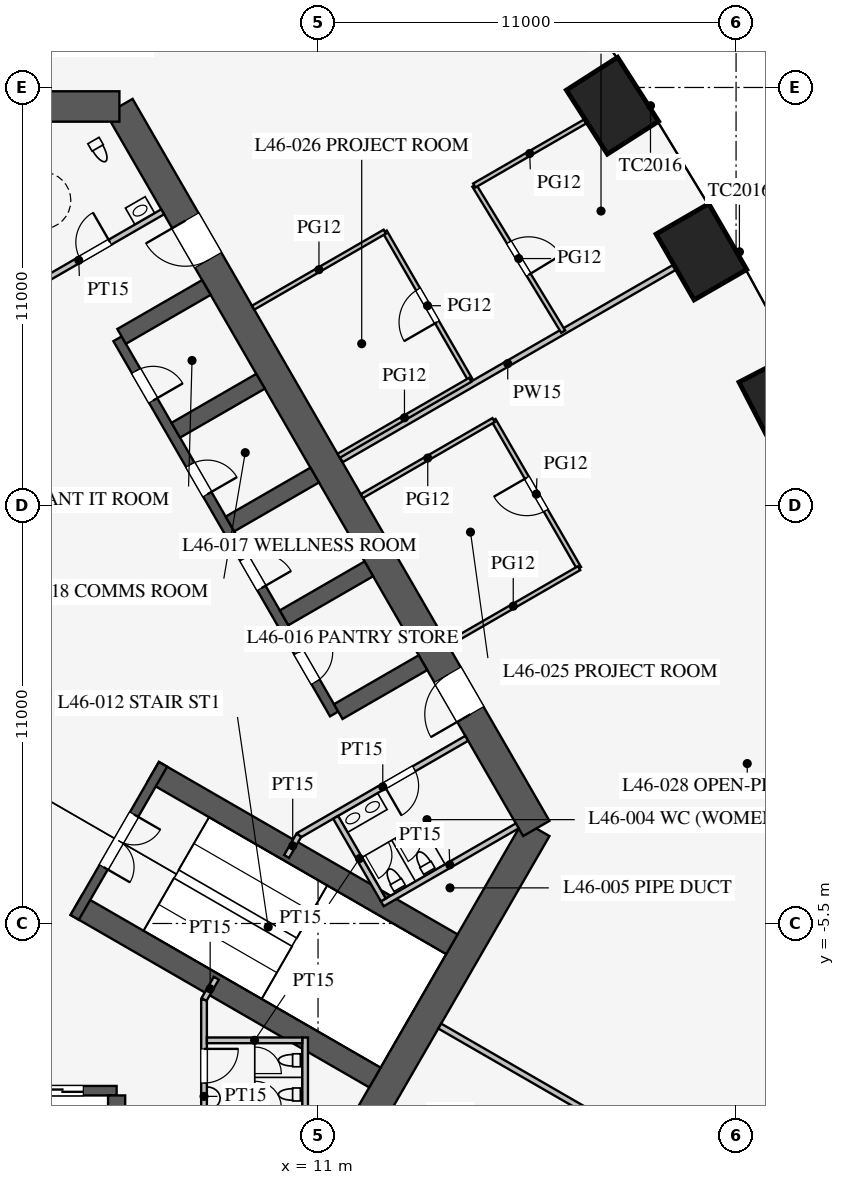
"""IFC4 building model, lengths in metres.
Left out: names, types, materials, properties, quantities, classifications, styles, units other than length and angle.
Written with IfcOpenShell. Run it as: python <this file> out.ifc"""

import sys

from ifc_helpers import new_model, si_unit, direction, frame, frame_2d, origin, origin_2d, place, context, subcontext, project, spatial, rectangle, extrude, element, fill, save


model = new_model("IFC4")
c1 = context("Model", 3, precision=1e-05, world=origin(), true_north=direction((0.0, 1.0)))
c2 = subcontext(c1, "Body", "Model", "MODEL_VIEW")
j1 = project(units=[si_unit("LENGTHUNIT", "METRE"), si_unit("PLANEANGLEUNIT", "RADIAN")], contexts=[c1])
p1 = place(None, origin())
s1 = spatial("IfcSite", under=j1, at=p1, CompositionType="ELEMENT")
p2 = place(p1, origin())
s2 = spatial("IfcBuilding", under=s1, at=p2, CompositionType="ELEMENT")
p3 = place(p2, frame((0.0, 0.0, 202.3)))
s3 = spatial("IfcBuildingStorey", under=s2, at=p3, CompositionType="ELEMENT", Elevation=202.3)
for number, where, z_axis, x_axis in (
    (1, (23.248, 8.226, 0.0), (0.0, 0.0, 1.0), (-0.46, 0.888, 0.0)),
    (2, (21.088, 12.175, 0.0), (0.0, 0.0, 1.0), (-0.5, 0.866, 0.0)),
    (3, (18.748, 16.02, 0.0), (0.0, 0.0, 1.0), (-0.539, 0.842, 0.0)),
):
    element("IfcColumn", number, at=place(p3, frame(where, z_axis=z_axis, x_axis=x_axis)), inside=s3, PredefinedType="COLUMN", context=c2, shape_type="SweptSolid", body=[
        extrude(rectangle(XDim=2.0, YDim=1.6, at=origin_2d()), origin(), (0.0, 0.0, 1.0), 4.2),
    ])
p4 = place(p3, frame((10.97, -13.0, 0.0), z_axis=(0.0, 0.0, 1.0), x_axis=(0.499995765644, 0.866027848477, 0.0)))
e4 = element("IfcWall", 4, at=p4, inside=s3, PredefinedType="SHEAR", context=c2, shape_type="SweptSolid", body=[
    extrude(rectangle(XDim=11.547, YDim=0.8, at=frame_2d((5.773, 0.0))), origin(), (0.0, 0.0, 1.0), 4.2),
])
p5 = place(p3, frame((16.743, -3.0, 0.0), z_axis=(0.0, 0.0, 1.0), x_axis=(-0.500002442456, 0.866023993627, 0.0)))
e5 = element("IfcWall", 5, at=p5, inside=s3, PredefinedType="SHEAR", context=c2, shape_type="SweptSolid", body=[
    extrude(rectangle(XDim=21.939, YDim=0.8, at=frame_2d((10.97, 0.0))), origin(), (0.0, 0.0, 1.0), 4.2),
])
p6 = place(p5, frame((17.27, 0.0, 0.0)))
e6 = element("IfcOpeningElement", 6, at=p6, cuts=e5, PredefinedType="OPENING", context=c2, shape_type="SweptSolid", body=[
    extrude(rectangle(XDim=1.2, YDim=2.1, at=frame_2d((0.6, 1.05))), frame((0.0, 0.41, 0.0), z_axis=(0.0, -1.0, 0.0), x_axis=(1.0, 0.0, 0.0)), (0.0, 0.0, 1.0), 0.82),
])
p7 = place(p5, frame((3.47, 0.0, 0.0)))
e7 = element("IfcOpeningElement", 7, at=p7, cuts=e5, PredefinedType="OPENING", context=c2, shape_type="SweptSolid", body=[
    extrude(rectangle(XDim=1.2, YDim=2.1, at=frame_2d((0.6, 1.05))), frame((0.0, 0.41, 0.0), z_axis=(0.0, -1.0, 0.0), x_axis=(1.0, 0.0, 0.0)), (0.0, 0.0, 1.0), 0.82),
])
p8 = place(p3, frame((5.773, 16.0, 0.0), z_axis=(0.0, 0.0, 1.0), x_axis=(-1.0, 0.0, 0.0)))
e8 = element("IfcWall", 8, at=p8, inside=s3, PredefinedType="SHEAR", context=c2, shape_type="SweptSolid", body=[
    extrude(rectangle(XDim=11.547, YDim=0.8, at=frame_2d((5.773, 0.0))), origin(), (0.0, 0.0, 1.0), 4.2),
])
p9 = place(p3, frame((-5.7, -9.9, 0.0), z_axis=(0.0, 0.0, 1.0), x_axis=(1.0, 0.0, 0.0)))
e9 = element("IfcWall", 9, at=p9, inside=s3, PredefinedType="SHEAR", context=c2, shape_type="SweptSolid", body=[
    extrude(rectangle(XDim=11.4, YDim=0.25, at=frame_2d((5.7, 0.0))), origin(), (0.0, 0.0, 1.0), 4.2),
])
p10 = place(p9, frame((0.875, 0.0, 0.0)))
e10 = element("IfcOpeningElement", 10, at=p10, cuts=e9, PredefinedType="OPENING", context=c2, shape_type="SweptSolid", body=[
    extrude(rectangle(XDim=1.1, YDim=2.2, at=frame_2d((0.55, 1.1))), frame((0.0, 0.135, 0.0), z_axis=(0.0, -1.0, 0.0), x_axis=(1.0, 0.0, 0.0)), (0.0, 0.0, 1.0), 0.27),
])
p11 = place(p9, frame((3.725, 0.0, 0.0)))
e11 = element("IfcOpeningElement", 11, at=p11, cuts=e9, PredefinedType="OPENING", context=c2, shape_type="SweptSolid", body=[
    extrude(rectangle(XDim=1.1, YDim=2.2, at=frame_2d((0.55, 1.1))), frame((0.0, 0.135, 0.0), z_axis=(0.0, -1.0, 0.0), x_axis=(1.0, 0.0, 0.0)), (0.0, 0.0, 1.0), 0.27),
])
p12 = place(p9, frame((6.575, 0.0, 0.0)))
e12 = element("IfcOpeningElement", 12, at=p12, cuts=e9, PredefinedType="OPENING", context=c2, shape_type="SweptSolid", body=[
    extrude(rectangle(XDim=1.1, YDim=2.2, at=frame_2d((0.55, 1.1))), frame((0.0, 0.135, 0.0), z_axis=(0.0, -1.0, 0.0), x_axis=(1.0, 0.0, 0.0)), (0.0, 0.0, 1.0), 0.27),
])
p13 = place(p9, frame((9.425, 0.0, 0.0)))
e13 = element("IfcOpeningElement", 13, at=p13, cuts=e9, PredefinedType="OPENING", context=c2, shape_type="SweptSolid", body=[
    extrude(rectangle(XDim=1.1, YDim=2.2, at=frame_2d((0.55, 1.1))), frame((0.0, 0.135, 0.0), z_axis=(0.0, -1.0, 0.0), x_axis=(1.0, 0.0, 0.0)), (0.0, 0.0, 1.0), 0.27),
])
p14 = place(p3, frame((5.7, -10.025, 0.0), z_axis=(0.0, 0.0, 1.0), x_axis=(0.0, -1.0, 0.0)))
e14 = element("IfcWall", 14, at=p14, inside=s3, PredefinedType="SHEAR", context=c2, shape_type="SweptSolid", body=[
    extrude(rectangle(XDim=2.575, YDim=0.45, at=frame_2d((1.288, 0.0))), origin(), (0.0, 0.0, 1.0), 4.2),
])
p15 = place(p3, frame((11.424, 0.014, 0.0), z_axis=(0.0, 0.0, 1.0), x_axis=(-0.500001763848, 0.866024385424, 0.0)))
e15 = element("IfcWall", 15, at=p15, inside=s3, PredefinedType="SHEAR", context=c2, shape_type="SweptSolid", body=[
    extrude(rectangle(XDim=11.4, YDim=0.25, at=frame_2d((5.7, 0.0))), origin(), (0.0, 0.0, 1.0), 4.2),
])
p16 = place(p15, frame((0.975, 0.0, 0.0)))
e16 = element("IfcOpeningElement", 16, at=p16, cuts=e15, PredefinedType="OPENING", context=c2, shape_type="SweptSolid", body=[
    extrude(rectangle(XDim=0.9, YDim=2.1, at=frame_2d((0.45, 1.05))), frame((0.0, 0.135, 0.0), z_axis=(0.0, -1.0, 0.0), x_axis=(1.0, 0.0, 0.0)), (0.0, 0.0, 1.0), 0.27),
])
p17 = place(p15, frame((3.825, 0.0, 0.0)))
e17 = element("IfcOpeningElement", 17, at=p17, cuts=e15, PredefinedType="OPENING", context=c2, shape_type="SweptSolid", body=[
    extrude(rectangle(XDim=0.9, YDim=2.1, at=frame_2d((0.45, 1.05))), frame((0.0, 0.135, 0.0), z_axis=(0.0, -1.0, 0.0), x_axis=(1.0, 0.0, 0.0)), (0.0, 0.0, 1.0), 0.27),
])
p18 = place(p15, frame((6.675, 0.0, 0.0)))
e18 = element("IfcOpeningElement", 18, at=p18, cuts=e15, PredefinedType="OPENING", context=c2, shape_type="SweptSolid", body=[
    extrude(rectangle(XDim=0.9, YDim=2.1, at=frame_2d((0.45, 1.05))), frame((0.0, 0.135, 0.0), z_axis=(0.0, -1.0, 0.0), x_axis=(1.0, 0.0, 0.0)), (0.0, 0.0, 1.0), 0.27),
])
p19 = place(p15, frame((9.525, 0.0, 0.0)))
e19 = element("IfcOpeningElement", 19, at=p19, cuts=e15, PredefinedType="OPENING", context=c2, shape_type="SweptSolid", body=[
    extrude(rectangle(XDim=0.9, YDim=2.1, at=frame_2d((0.45, 1.05))), frame((0.0, 0.135, 0.0), z_axis=(0.0, -1.0, 0.0), x_axis=(1.0, 0.0, 0.0)), (0.0, 0.0, 1.0), 0.27),
])
for number, where, z_axis, x_axis in (
    (20, (11.532, 0.076, 0.0), (0.0, 0.0, 1.0), (0.866, 0.5, 0.0)),
    (21, (10.107, 2.544, 0.0), (0.0, 0.0, 1.0), (0.866, 0.5, 0.0)),
    (22, (8.682, 5.012, 0.0), (0.0, 0.0, 1.0), (0.866, 0.5, 0.0)),
    (23, (7.257, 7.481, 0.0), (0.0, 0.0, 1.0), (0.866, 0.5, 0.0)),
):
    element("IfcWall", number, at=place(p3, frame(where, z_axis=z_axis, x_axis=x_axis)), inside=s3, PredefinedType="SHEAR", context=c2, shape_type="SweptSolid", body=[
        extrude(rectangle(XDim=2.575, YDim=0.45, at=frame_2d((1.288, 0.0))), origin(), (0.0, 0.0, 1.0), 4.2),
    ])
p20 = place(p3, frame((5.832, 9.949, 0.0), z_axis=(0.0, 0.0, 1.0), x_axis=(0.866029291668, 0.499993265928, 0.0)))
e24 = element("IfcWall", 24, at=p20, inside=s3, PredefinedType="SHEAR", context=c2, shape_type="SweptSolid", body=[
    extrude(rectangle(XDim=2.575, YDim=0.45, at=frame_2d((1.288, 0.0))), origin(), (0.0, 0.0, 1.0), 4.2),
])
for number, where, z_axis, x_axis in (
    (25, (4.638, -5.016, 0.0), (0.0, 0.0, 1.0), (0.866, -0.5, 0.0)),
    (26, (6.663, -1.509, 0.0), (0.0, 0.0, 1.0), (0.866, -0.5, 0.0)),
):
    element("IfcWall", number, at=place(p3, frame(where, z_axis=z_axis, x_axis=x_axis)), inside=s3, PredefinedType="SHEAR", context=c2, shape_type="SweptSolid", body=[
        extrude(rectangle(XDim=9.075, YDim=0.6, at=frame_2d((4.538, 0.0))), origin(), (0.0, 0.0, 1.0), 4.2),
    ])
p21 = place(p3, frame((4.597, -5.339, 0.0), z_axis=(0.0, 0.0, 1.0), x_axis=(0.499984536904, 0.866034331223, 0.0)))
e27 = element("IfcWall", 27, at=p21, inside=s3, PredefinedType="SHEAR", context=c2, shape_type="SweptSolid", body=[
    extrude(rectangle(XDim=4.65, YDim=0.25, at=frame_2d((2.325, 0.0))), origin(), (0.0, 0.0, 1.0), 4.2),
])
p22 = place(p21, frame((1.525, 0.0, 0.0)))
e28 = element("IfcOpeningElement", 28, at=p22, cuts=e27, PredefinedType="OPENING", context=c2, shape_type="SweptSolid", body=[
    extrude(rectangle(XDim=1.6, YDim=2.1, at=frame_2d((0.8, 1.05))), frame((0.0, 0.135, 0.0), z_axis=(0.0, -1.0, 0.0), x_axis=(1.0, 0.0, 0.0)), (0.0, 0.0, 1.0), 0.27),
])
p23 = place(p3, frame((8.0, -7.5, 0.0), z_axis=(0.0, 0.0, 1.0), x_axis=(0.0, -1.0, 0.0)))
e29 = element("IfcWall", 29, at=p23, inside=s3, PredefinedType="PARTITIONING", context=c2, shape_type="SweptSolid", body=[
    extrude(rectangle(XDim=5.1, YDim=0.15, at=frame_2d((2.55, 0.0))), origin(), (0.0, 0.0, 1.0), 4.0),
])
p24 = place(p23, frame((1.3, 0.0, 0.0)))
e30 = element("IfcOpeningElement", 30, at=p24, cuts=e29, PredefinedType="OPENING", context=c2, shape_type="SweptSolid", body=[
    extrude(rectangle(XDim=0.9, YDim=2.1, at=frame_2d((0.45, 1.05))), frame((0.0, 0.085, 0.0), z_axis=(0.0, -1.0, 0.0), x_axis=(1.0, 0.0, 0.0)), (0.0, 0.0, 1.0), 0.17),
])
p25 = place(p3, frame((2.495, 10.678, 0.0), z_axis=(0.0, 0.0, 1.0), x_axis=(0.86602216432, 0.500005610874, 0.0)))
e31 = element("IfcWall", 31, at=p25, inside=s3, PredefinedType="PARTITIONING", context=c2, shape_type="SweptSolid", body=[
    extrude(rectangle(XDim=5.1, YDim=0.15, at=frame_2d((2.55, 0.0))), origin(), (0.0, 0.0, 1.0), 4.0),
])
p26 = place(p25, frame((2.6, 0.0, 0.0)))
e32 = element("IfcOpeningElement", 32, at=p26, cuts=e31, PredefinedType="OPENING", context=c2, shape_type="SweptSolid", body=[
    extrude(rectangle(XDim=0.9, YDim=2.1, at=frame_2d((0.45, 1.05))), frame((0.0, 0.085, 0.0), z_axis=(0.0, -1.0, 0.0), x_axis=(1.0, 0.0, 0.0)), (0.0, 0.0, 1.0), 0.17),
])
p27 = place(p3, frame((10.495, -3.178, 0.0), z_axis=(0.0, 0.0, 1.0), x_axis=(0.86602216432, 0.500005610874, 0.0)))
e33 = element("IfcWall", 33, at=p27, inside=s3, PredefinedType="PARTITIONING", context=c2, shape_type="SweptSolid", body=[
    extrude(rectangle(XDim=5.1, YDim=0.15, at=frame_2d((2.55, 0.0))), origin(), (0.0, 0.0, 1.0), 4.0),
])
p28 = place(p27, frame((2.6, 0.0, 0.0)))
e34 = element("IfcOpeningElement", 34, at=p28, cuts=e33, PredefinedType="OPENING", context=c2, shape_type="SweptSolid", body=[
    extrude(rectangle(XDim=0.9, YDim=2.1, at=frame_2d((0.45, 1.05))), frame((0.0, 0.085, 0.0), z_axis=(0.0, -1.0, 0.0), x_axis=(1.0, 0.0, 0.0)), (0.0, 0.0, 1.0), 0.17),
])
for number, where, z_axis, x_axis in (
    (35, (8.0, -7.5, 0.0), (0.0, 0.0, 1.0), (0.5, 0.866, 0.0)),
    (36, (10.495, -3.178, 0.0), (0.0, 0.0, 1.0), (-0.5, -0.866, 0.0)),
):
    element("IfcWall", number, at=place(p3, frame(where, z_axis=z_axis, x_axis=x_axis)), inside=s3, PredefinedType="PARTITIONING", context=c2, shape_type="SweptSolid", body=[
        extrude(rectangle(XDim=0.645, YDim=0.15, at=frame_2d((0.323, 0.0))), origin(), (0.0, 0.0, 1.0), 4.0),
    ])
p29 = place(p3, frame((10.66, -8.5, 0.0), z_axis=(0.0, 0.0, 1.0), x_axis=(0.0, -1.0, 0.0)))
e37 = element("IfcWall", 37, at=p29, inside=s3, PredefinedType="PARTITIONING", context=c2, shape_type="SweptSolid", body=[
    extrude(rectangle(XDim=4.1, YDim=0.15, at=frame_2d((2.05, 0.0))), origin(), (0.0, 0.0, 1.0), 4.0),
])
p30 = place(p3, frame((8.075, -8.575, 0.0), z_axis=(0.0, 0.0, 1.0), x_axis=(1.0, 0.0, 0.0)))
e38 = element("IfcWall", 38, at=p30, inside=s3, PredefinedType="PARTITIONING", context=c2, shape_type="SweptSolid", body=[
    extrude(rectangle(XDim=2.51, YDim=0.15, at=frame_2d((1.255, 0.0))), origin(), (0.0, 0.0, 1.0), 4.0),
])
p31 = place(p3, frame((12.691, -4.982, 0.0), z_axis=(0.0, 0.0, 1.0), x_axis=(0.8660249478, 0.500000789788, 0.0)))
e39 = element("IfcWall", 39, at=p31, inside=s3, PredefinedType="PARTITIONING", context=c2, shape_type="SweptSolid", body=[
    extrude(rectangle(XDim=4.1, YDim=0.15, at=frame_2d((2.05, 0.0))), origin(), (0.0, 0.0, 1.0), 4.0),
])
p32 = place(p3, frame((11.464, -2.706, 0.0), z_axis=(0.0, 0.0, 1.0), x_axis=(0.50001992892, -0.866013897511, 0.0)))
e40 = element("IfcWall", 40, at=p32, inside=s3, PredefinedType="PARTITIONING", context=c2, shape_type="SweptSolid", body=[
    extrude(rectangle(XDim=2.51, YDim=0.15, at=frame_2d((1.255, 0.0))), origin(), (0.0, 0.0, 1.0), 4.0),
])
p33 = place(p3, frame((14.203, -8.2, 0.0), z_axis=(0.0, 0.0, 1.0), x_axis=(0.866021600284, -0.500006587798, 0.0)))
e41 = element("IfcWall", 41, at=p33, inside=s3, PredefinedType="PARTITIONING", context=c2, shape_type="SweptSolid", body=[
    extrude(rectangle(XDim=14.95, YDim=0.15, at=frame_2d((7.475, 0.0))), origin(), (0.0, 0.0, 1.0), 2.4),
])
p34 = place(p3, frame((11.613, 6.705, 0.0), z_axis=(0.0, 0.0, 1.0), x_axis=(0.866032382055, 0.499987913086, 0.0)))
e42 = element("IfcWall", 42, at=p34, inside=s3, PredefinedType="PARTITIONING", context=c2, shape_type="SweptSolid", body=[
    extrude(rectangle(XDim=10.111, YDim=0.15, at=frame_2d((5.055, 0.0))), origin(), (0.0, 0.0, 1.0), 3.3),
])
p35 = place(p3, frame((15.006, 8.808, 0.0), z_axis=(0.0, 0.0, 1.0), x_axis=(-0.500013631625, 0.866017533419, 0.0)))
e43 = element("IfcWall", 43, at=p35, inside=s3, PredefinedType="PARTITIONING", context=c2, shape_type="SweptSolid", body=[
    extrude(rectangle(XDim=4.5, YDim=0.12, at=frame_2d((2.25, 0.0))), origin(), (0.0, 0.0, 1.0), 2.9),
])
p36 = place(p35, frame((1.75, 0.0, 0.15)))
e44 = element("IfcOpeningElement", 44, at=p36, cuts=e43, PredefinedType="OPENING", context=c2, shape_type="SweptSolid", body=[
    extrude(rectangle(XDim=1.0, YDim=2.1, at=frame_2d((0.5, 1.05))), frame((0.0, 0.07, 0.0), z_axis=(0.0, -1.0, 0.0), x_axis=(1.0, 0.0, 0.0)), (0.0, 0.0, 1.0), 0.14),
])
p37 = place(p3, frame((17.869, 3.85, 0.0), z_axis=(0.0, 0.0, 1.0), x_axis=(-0.500013631625, 0.866017533419, 0.0)))
e45 = element("IfcWall", 45, at=p37, inside=s3, PredefinedType="PARTITIONING", context=c2, shape_type="SweptSolid", body=[
    extrude(rectangle(XDim=4.5, YDim=0.12, at=frame_2d((2.25, 0.0))), origin(), (0.0, 0.0, 1.0), 2.9),
])
p38 = place(p37, frame((1.75, 0.0, 0.15)))
e46 = element("IfcOpeningElement", 46, at=p38, cuts=e45, PredefinedType="OPENING", context=c2, shape_type="SweptSolid", body=[
    extrude(rectangle(XDim=1.0, YDim=2.1, at=frame_2d((0.5, 1.05))), frame((0.0, 0.07, 0.0), z_axis=(0.0, -1.0, 0.0), x_axis=(1.0, 0.0, 0.0)), (0.0, 0.0, 1.0), 0.14),
])
for number, where, z_axis, x_axis in (
    (47, (11.542, 6.808, 0.0), (0.0, 0.0, 1.0), (0.866, 0.5, 0.0)),
    (48, (9.292, 10.705, 0.0), (0.0, 0.0, 1.0), (0.866, 0.5, 0.0)),
    (49, (12.155, 5.747, 0.0), (0.0, 0.0, 1.0), (0.866, 0.5, 0.0)),
    (50, (14.405, 1.85, 0.0), (0.0, 0.0, 1.0), (0.866, 0.5, 0.0)),
):
    element("IfcWall", number, at=place(p3, frame(where, z_axis=z_axis, x_axis=x_axis)), inside=s3, PredefinedType="PARTITIONING", context=c2, shape_type="SweptSolid", body=[
        extrude(rectangle(XDim=4.0, YDim=0.12, at=frame_2d((2.0, 0.0))), origin(), (0.0, 0.0, 1.0), 2.9),
    ])
p39 = place(p3, frame((17.451, 10.075, 0.0), z_axis=(0.0, 0.0, 1.0), x_axis=(-0.519790350351, 0.85429385558, 0.0)))
e51 = element("IfcWall", 51, at=p39, inside=s3, PredefinedType="PARTITIONING", context=c2, shape_type="SweptSolid", body=[
    extrude(rectangle(XDim=4.501, YDim=0.12, at=frame_2d((2.25, 0.0))), origin(), (0.0, 0.0, 1.0), 2.9),
])
p40 = place(p39, frame((1.75, 0.0, 0.15)))
e52 = element("IfcOpeningElement", 52, at=p40, cuts=e51, PredefinedType="OPENING", context=c2, shape_type="SweptSolid", body=[
    extrude(rectangle(XDim=1.0, YDim=2.1, at=frame_2d((0.5, 1.05))), frame((0.0, 0.07, 0.0), z_axis=(0.0, -1.0, 0.0), x_axis=(1.0, 0.0, 0.0)), (0.0, 0.0, 1.0), 0.14),
])
p41 = place(p3, frame((15.111, 13.921, 0.0), z_axis=(0.0, 0.0, 1.0), x_axis=(0.865999698775, 0.50004451974, 0.0)))
e53 = element("IfcWall", 53, at=p41, inside=s3, PredefinedType="PARTITIONING", context=c2, shape_type="SweptSolid", body=[
    extrude(rectangle(XDim=3.368, YDim=0.12, at=frame_2d((1.684, 0.0))), origin(), (0.0, 0.0, 1.0), 2.9),
])
p42 = place(p24, origin())
e54 = element("IfcDoor", 54, at=p42, inside=s3, OperationType="SINGLE_SWING_LEFT", PredefinedType="DOOR", context=c2, shape_type="SweptSolid", body=[
    extrude(rectangle(XDim=0.9, YDim=2.1, at=frame_2d((0.45, 1.05))), frame((0.0, 0.025, 0.0), z_axis=(0.0, -1.0, 0.0), x_axis=(1.0, 0.0, 0.0)), (0.0, 0.0, 1.0), 0.05),
])
fill(e30, e54)
p43 = place(p26, origin())
e55 = element("IfcDoor", 55, at=p43, inside=s3, OperationType="SINGLE_SWING_RIGHT", PredefinedType="DOOR", context=c2, shape_type="SweptSolid", body=[
    extrude(rectangle(XDim=0.9, YDim=2.1, at=frame_2d((0.45, 1.05))), frame((0.0, 0.025, 0.0), z_axis=(0.0, -1.0, 0.0), x_axis=(1.0, 0.0, 0.0)), (0.0, 0.0, 1.0), 0.05),
])
fill(e32, e55)
p44 = place(p28, frame((0.9, 0.0, 0.0), z_axis=(0.0, 0.0, 1.0), x_axis=(-1.0, 0.0, 0.0)))
e56 = element("IfcDoor", 56, at=p44, inside=s3, OperationType="SINGLE_SWING_RIGHT", PredefinedType="DOOR", context=c2, shape_type="SweptSolid", body=[
    extrude(rectangle(XDim=0.9, YDim=2.1, at=frame_2d((0.45, 1.05))), frame((0.0, 0.025, 0.0), z_axis=(0.0, -1.0, 0.0), x_axis=(1.0, 0.0, 0.0)), (0.0, 0.0, 1.0), 0.05),
])
fill(e34, e56)
p45 = place(p22, frame((1.6, 0.0, 0.0), z_axis=(0.0, 0.0, 1.0), x_axis=(-1.0, 0.0, 0.0)))
e57 = element("IfcDoor", 57, at=p45, inside=s3, OperationType="DOUBLE_DOOR_SINGLE_SWING", PredefinedType="DOOR", context=c2, shape_type="SweptSolid", body=[
    extrude(rectangle(XDim=1.6, YDim=2.1, at=frame_2d((0.8, 1.05))), frame((0.0, 0.025, 0.0), z_axis=(0.0, -1.0, 0.0), x_axis=(1.0, 0.0, 0.0)), (0.0, 0.0, 1.0), 0.05),
])
fill(e28, e57)
p46 = place(p6, origin())
e58 = element("IfcDoor", 58, at=p46, inside=s3, OperationType="SINGLE_SWING_RIGHT", PredefinedType="DOOR", context=c2, shape_type="SweptSolid", body=[
    extrude(rectangle(XDim=1.2, YDim=2.1, at=frame_2d((0.6, 1.05))), frame((0.0, 0.025, 0.0), z_axis=(0.0, -1.0, 0.0), x_axis=(1.0, 0.0, 0.0)), (0.0, 0.0, 1.0), 0.05),
])
fill(e6, e58)
p47 = place(p7, origin())
e59 = element("IfcDoor", 59, at=p47, inside=s3, OperationType="SINGLE_SWING_LEFT", PredefinedType="DOOR", context=c2, shape_type="SweptSolid", body=[
    extrude(rectangle(XDim=1.2, YDim=2.1, at=frame_2d((0.6, 1.05))), frame((0.0, 0.025, 0.0), z_axis=(0.0, -1.0, 0.0), x_axis=(1.0, 0.0, 0.0)), (0.0, 0.0, 1.0), 0.05),
])
fill(e7, e59)
p48 = place(p16, frame((0.9, 0.0, 0.0), z_axis=(0.0, 0.0, 1.0), x_axis=(-1.0, 0.0, 0.0)))
e60 = element("IfcDoor", 60, at=p48, inside=s3, OperationType="SINGLE_SWING_LEFT", PredefinedType="DOOR", context=c2, shape_type="SweptSolid", body=[
    extrude(rectangle(XDim=0.9, YDim=2.1, at=frame_2d((0.45, 1.05))), frame((0.0, 0.025, 0.0), z_axis=(0.0, -1.0, 0.0), x_axis=(1.0, 0.0, 0.0)), (0.0, 0.0, 1.0), 0.05),
])
fill(e16, e60)
p49 = place(p17, frame((0.9, 0.0, 0.0), z_axis=(0.0, 0.0, 1.0), x_axis=(-1.0, 0.0, 0.0)))
e61 = element("IfcDoor", 61, at=p49, inside=s3, OperationType="SINGLE_SWING_RIGHT", PredefinedType="DOOR", context=c2, shape_type="SweptSolid", body=[
    extrude(rectangle(XDim=0.9, YDim=2.1, at=frame_2d((0.45, 1.05))), frame((0.0, 0.025, 0.0), z_axis=(0.0, -1.0, 0.0), x_axis=(1.0, 0.0, 0.0)), (0.0, 0.0, 1.0), 0.05),
])
fill(e17, e61)
p50 = place(p18, frame((0.9, 0.0, 0.0), z_axis=(0.0, 0.0, 1.0), x_axis=(-1.0, 0.0, 0.0)))
e62 = element("IfcDoor", 62, at=p50, inside=s3, OperationType="SINGLE_SWING_RIGHT", PredefinedType="DOOR", context=c2, shape_type="SweptSolid", body=[
    extrude(rectangle(XDim=0.9, YDim=2.1, at=frame_2d((0.45, 1.05))), frame((0.0, 0.025, 0.0), z_axis=(0.0, -1.0, 0.0), x_axis=(1.0, 0.0, 0.0)), (0.0, 0.0, 1.0), 0.05),
])
fill(e18, e62)
p51 = place(p19, frame((0.9, 0.0, 0.0), z_axis=(0.0, 0.0, 1.0), x_axis=(-1.0, 0.0, 0.0)))
e63 = element("IfcDoor", 63, at=p51, inside=s3, OperationType="SINGLE_SWING_RIGHT", PredefinedType="DOOR", context=c2, shape_type="SweptSolid", body=[
    extrude(rectangle(XDim=0.9, YDim=2.1, at=frame_2d((0.45, 1.05))), frame((0.0, 0.025, 0.0), z_axis=(0.0, -1.0, 0.0), x_axis=(1.0, 0.0, 0.0)), (0.0, 0.0, 1.0), 0.05),
])
fill(e19, e63)
p52 = place(p38, origin())
e64 = element("IfcDoor", 64, at=p52, inside=s3, OperationType="SINGLE_SWING_RIGHT", PredefinedType="DOOR", context=c2, shape_type="SweptSolid", body=[
    extrude(rectangle(XDim=1.0, YDim=2.1, at=frame_2d((0.5, 1.05))), frame((0.0, 0.025, 0.0), z_axis=(0.0, -1.0, 0.0), x_axis=(1.0, 0.0, 0.0)), (0.0, 0.0, 1.0), 0.05),
])
fill(e46, e64)
p53 = place(p36, origin())
e65 = element("IfcDoor", 65, at=p53, inside=s3, OperationType="SINGLE_SWING_LEFT", PredefinedType="DOOR", context=c2, shape_type="SweptSolid", body=[
    extrude(rectangle(XDim=1.0, YDim=2.1, at=frame_2d((0.5, 1.05))), frame((0.0, 0.025, 0.0), z_axis=(0.0, -1.0, 0.0), x_axis=(1.0, 0.0, 0.0)), (0.0, 0.0, 1.0), 0.05),
])
fill(e44, e65)
p54 = place(p40, frame((1.0, 0.0, 0.0), z_axis=(0.0, 0.0, 1.0), x_axis=(-1.0, 0.0, 0.0)))
e66 = element("IfcDoor", 66, at=p54, inside=s3, OperationType="SINGLE_SWING_RIGHT", PredefinedType="DOOR", context=c2, shape_type="SweptSolid", body=[
    extrude(rectangle(XDim=1.0, YDim=2.1, at=frame_2d((0.5, 1.05))), frame((0.0, 0.025, 0.0), z_axis=(0.0, -1.0, 0.0), x_axis=(1.0, 0.0, 0.0)), (0.0, 0.0, 1.0), 0.05),
])
fill(e52, e66)
p55 = place(p13, origin())
e67 = element("IfcDoor", 67, at=p55, inside=s3, OperationType="DOUBLE_DOOR_SLIDING", PredefinedType="DOOR", context=c2, shape_type="SweptSolid", body=[
    extrude(rectangle(XDim=1.1, YDim=2.2, at=frame_2d((0.55, 1.1))), frame((0.0, 0.025, 0.0), z_axis=(0.0, -1.0, 0.0), x_axis=(1.0, 0.0, 0.0)), (0.0, 0.0, 1.0), 0.05),
])
fill(e13, e67)
save(model, sys.argv[1])
